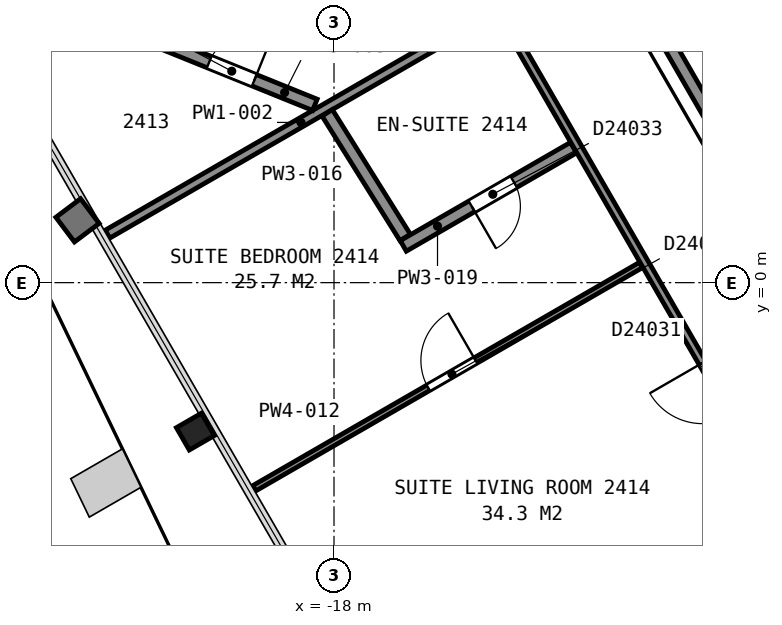
"""IFC4 building model, lengths in metres.
Left out: names, types, materials, properties, quantities, classifications, styles, units other than length and angle.
Written with IfcOpenShell. Run it as: python <this file> out.ifc"""

import sys

from ifc_helpers import new_model, si_unit, direction, frame, frame_2d, origin, origin_2d, place, context, subcontext, project, spatial, rectangle, i_section, extrude, element, fill, save


model = new_model("IFC4")
c1 = context("Model", 3, precision=1e-05, world=origin(), true_north=direction((0.0, 1.0)))
c2 = subcontext(c1, "Body", "Model", "MODEL_VIEW")
j1 = project(units=[si_unit("LENGTHUNIT", "METRE"), si_unit("PLANEANGLEUNIT", "RADIAN")], contexts=[c1])
p1 = place(None, origin())
s1 = spatial("IfcSite", under=j1, at=p1, CompositionType="ELEMENT")
p2 = place(p1, origin())
s2 = spatial("IfcBuilding", under=s1, at=p2, CompositionType="ELEMENT")
p3 = place(p2, frame((0.0, 0.0, 103.6)))
s3 = spatial("IfcBuildingStorey", under=s2, at=p3, CompositionType="ELEMENT", Elevation=103.6)
p4 = place(p3, frame((-20.28, -2.45, 0.04), z_axis=(0.0, 0.0, 1.0), x_axis=(-0.5, 0.866025403784, 0.0)))
e1 = element("IfcColumn", 1, at=p4, inside=s3, PredefinedType="COLUMN", context=c2, shape_type="SweptSolid", body=[
    extrude(i_section(OverallWidth=0.424, OverallDepth=0.475, WebThickness=0.048, FlangeThickness=0.077, FilletRadius=0.015, at=origin_2d()), origin(), (0.0, 0.0, 1.0), 3.56),
])
p5 = place(p3, frame((-7.678, 2.701, 0.0), z_axis=(0.0, 0.0, 1.0), x_axis=(-0.866026010844, 0.49999894854, 0.0)))
e2 = element("IfcWall", 2, at=p5, inside=s3, PredefinedType="PARTITIONING", context=c2, shape_type="SweptSolid", body=[
    extrude(rectangle(XDim=12.0, YDim=0.2, at=frame_2d((6.0, 0.0))), origin(), (0.0, 0.0, 1.0), 3.35),
])
p6 = place(p3, frame((-13.664, 5.946, 0.0), z_axis=(0.0, 0.0, 1.0), x_axis=(0.499994327219, -0.866028678941, 0.0)))
e3 = element("IfcWall", 3, at=p6, inside=s3, PredefinedType="PARTITIONING", context=c2, shape_type="SweptSolid", body=[
    extrude(rectangle(XDim=23.968, YDim=0.2, at=frame_2d((11.984, 0.0))), origin(), (0.0, 0.0, 1.0), 3.35),
])
p7 = place(p3, frame((-21.725, 0.798, 0.0), z_axis=(0.0, 0.0, 1.0), x_axis=(0.866003534372, 0.50003787702, 0.0)))
e4 = element("IfcWall", 4, at=p7, inside=s3, PredefinedType="PARTITIONING", context=c2, shape_type="SweptSolid", body=[
    extrude(rectangle(XDim=7.348, YDim=0.15, at=frame_2d((3.674, 0.0))), origin(), (0.0, 0.0, 1.0), 2.613),
])
p8 = place(p3, frame((-21.021, 4.02, 0.0), z_axis=(0.0, 0.0, 1.0), x_axis=(0.927010502524, -0.375035369278, 0.0)))
e5 = element("IfcWall", 5, at=p8, inside=s3, PredefinedType="PARTITIONING", context=c2, shape_type="SweptSolid", body=[
    extrude(rectangle(XDim=2.92, YDim=0.2, at=frame_2d((1.46, 0.0))), origin(), (0.0, 0.0, 1.0), 2.613),
])
p9 = place(p8, frame((1.045, 0.0, 0.0)))
e6 = element("IfcOpeningElement", 6, at=p9, cuts=e5, PredefinedType="OPENING", context=c2, shape_type="SweptSolid", body=[
    extrude(rectangle(XDim=0.8, YDim=2.1, at=frame_2d((0.4, 1.05))), frame((0.0, 0.11, 0.0), z_axis=(0.0, -1.0, 0.0), x_axis=(1.0, 0.0, 0.0)), (0.0, 0.0, 1.0), 0.22),
])
p10 = place(p3, frame((-19.311, -3.382, 0.0), z_axis=(0.0, 0.0, 1.0), x_axis=(0.865995225926, 0.500052265941, 0.0)))
e7 = element("IfcWall", 7, at=p10, inside=s3, PredefinedType="PARTITIONING", context=c2, shape_type="SweptSolid", body=[
    extrude(rectangle(XDim=7.347, YDim=0.1, at=frame_2d((3.674, 0.0))), origin(), (0.0, 0.0, 1.0), 2.613),
])
p11 = place(p10, frame((3.303, 0.0, 0.0)))
e8 = element("IfcOpeningElement", 8, at=p11, cuts=e7, PredefinedType="OPENING", context=c2, shape_type="SweptSolid", body=[
    extrude(rectangle(XDim=0.9, YDim=2.1, at=frame_2d((0.45, 1.05))), frame((0.0, 0.06, 0.0), z_axis=(0.0, -1.0, 0.0), x_axis=(1.0, 0.0, 0.0)), (0.0, 0.0, 1.0), 0.12),
])
p12 = place(p3, frame((-18.112, 2.793, 0.0), z_axis=(0.0, 0.0, 1.0), x_axis=(0.530334606404, -0.847788420097, 0.0)))
e9 = element("IfcWall", 9, at=p12, inside=s3, PredefinedType="PARTITIONING", context=c2, shape_type="SweptSolid", body=[
    extrude(rectangle(XDim=2.419, YDim=0.2, at=frame_2d((1.209, 0.0))), origin(), (0.0, 0.0, 1.0), 2.613),
])
p13 = place(p3, frame((-16.898, -7.562, 0.0), z_axis=(0.0, 0.0, 1.0), x_axis=(0.866055004685, 0.499948726231, 0.0)))
e10 = element("IfcWall", 10, at=p13, inside=s3, PredefinedType="PARTITIONING", context=c2, shape_type="SweptSolid", body=[
    extrude(rectangle(XDim=7.347, YDim=0.15, at=frame_2d((3.674, 0.0))), origin(), (0.0, 0.0, 1.0), 2.613),
])
p14 = place(p3, frame((-16.861, 0.604, 0.0), z_axis=(0.0, 0.0, 1.0), x_axis=(0.866003189247, 0.500038474733, 0.0)))
e11 = element("IfcWall", 11, at=p14, inside=s3, PredefinedType="PARTITIONING", context=c2, shape_type="SweptSolid", body=[
    extrude(rectangle(XDim=3.232, YDim=0.2, at=frame_2d((1.616, 0.0))), origin(), (0.0, 0.0, 1.0), 2.613),
])
p15 = place(p14, frame((1.3, 0.0, 0.0)))
e12 = element("IfcOpeningElement", 12, at=p15, cuts=e11, PredefinedType="OPENING", context=c2, shape_type="SweptSolid", body=[
    extrude(rectangle(XDim=0.8, YDim=2.1, at=frame_2d((0.4, 1.05))), frame((0.0, 0.11, 0.0), z_axis=(0.0, -1.0, 0.0), x_axis=(1.0, 0.0, 0.0)), (0.0, 0.0, 1.0), 0.22),
])
p16 = place(p3, frame((-3.756, -15.494, 0.0), z_axis=(0.0, 0.0, 1.0), x_axis=(-0.500027787016, 0.866009360349, 0.0)))
e13 = element("IfcWall", 13, at=p16, inside=s3, PredefinedType="PARTITIONING", context=c2, shape_type="SweptSolid", body=[
    extrude(rectangle(XDim=23.856, YDim=0.125, at=frame_2d((11.928, 0.0))), origin(), (0.0, 0.0, 1.0), 2.613),
])
p17 = place(p16, frame((15.368, 0.0, 0.0)))
e14 = element("IfcOpeningElement", 14, at=p17, cuts=e13, PredefinedType="OPENING", context=c2, shape_type="SweptSolid", body=[
    extrude(rectangle(XDim=1.0, YDim=2.1, at=frame_2d((0.5, 1.05))), frame((0.0, 0.073, 0.0), z_axis=(0.0, -1.0, 0.0), x_axis=(1.0, 0.0, 0.0)), (0.0, 0.0, 1.0), 0.145),
])
p18 = place(p16, frame((10.54, 0.0, 0.0)))
e15 = element("IfcOpeningElement", 15, at=p18, cuts=e13, PredefinedType="OPENING", context=c2, shape_type="SweptSolid", body=[
    extrude(rectangle(XDim=1.0, YDim=2.1, at=frame_2d((0.5, 1.05))), frame((0.0, 0.073, 0.0), z_axis=(0.0, -1.0, 0.0), x_axis=(1.0, 0.0, 0.0)), (0.0, 0.0, 1.0), 0.145),
])
p19 = place(p9, origin())
e16 = element("IfcDoor", 16, at=p19, inside=s3, OperationType="SINGLE_SWING_RIGHT", PredefinedType="DOOR", context=c2, shape_type="SweptSolid", body=[
    extrude(rectangle(XDim=0.8, YDim=2.1, at=frame_2d((0.4, 1.05))), frame((0.0, 0.025, 0.0), z_axis=(0.0, -1.0, 0.0), x_axis=(1.0, 0.0, 0.0)), (0.0, 0.0, 1.0), 0.05),
])
fill(e6, e16)
p20 = place(p11, origin())
e17 = element("IfcDoor", 17, at=p20, inside=s3, OperationType="SINGLE_SWING_RIGHT", PredefinedType="DOOR", context=c2, shape_type="SweptSolid", body=[
    extrude(rectangle(XDim=0.9, YDim=2.1, at=frame_2d((0.45, 1.05))), frame((0.0, 0.025, 0.0), z_axis=(0.0, -1.0, 0.0), x_axis=(1.0, 0.0, 0.0)), (0.0, 0.0, 1.0), 0.05),
])
fill(e8, e17)
p21 = place(p15, origin())
e18 = element("IfcDoor", 18, at=p21, inside=s3, OperationType="SINGLE_SWING_LEFT", PredefinedType="DOOR", context=c2, shape_type="SweptSolid", body=[
    extrude(rectangle(XDim=0.8, YDim=2.1, at=frame_2d((0.4, 1.05))), frame((0.0, 0.025, 0.0), z_axis=(0.0, -1.0, 0.0), x_axis=(1.0, 0.0, 0.0)), (0.0, 0.0, 1.0), 0.05),
])
fill(e12, e18)
p22 = place(p17, origin())
e19 = element("IfcDoor", 19, at=p22, inside=s3, OperationType="SINGLE_SWING_RIGHT", PredefinedType="DOOR", context=c2, shape_type="SweptSolid", body=[
    extrude(rectangle(XDim=1.0, YDim=2.1, at=frame_2d((0.5, 1.05))), frame((0.0, 0.025, 0.0), z_axis=(0.0, -1.0, 0.0), x_axis=(1.0, 0.0, 0.0)), (0.0, 0.0, 1.0), 0.05),
])
fill(e14, e19)
save(model, sys.argv[1])
